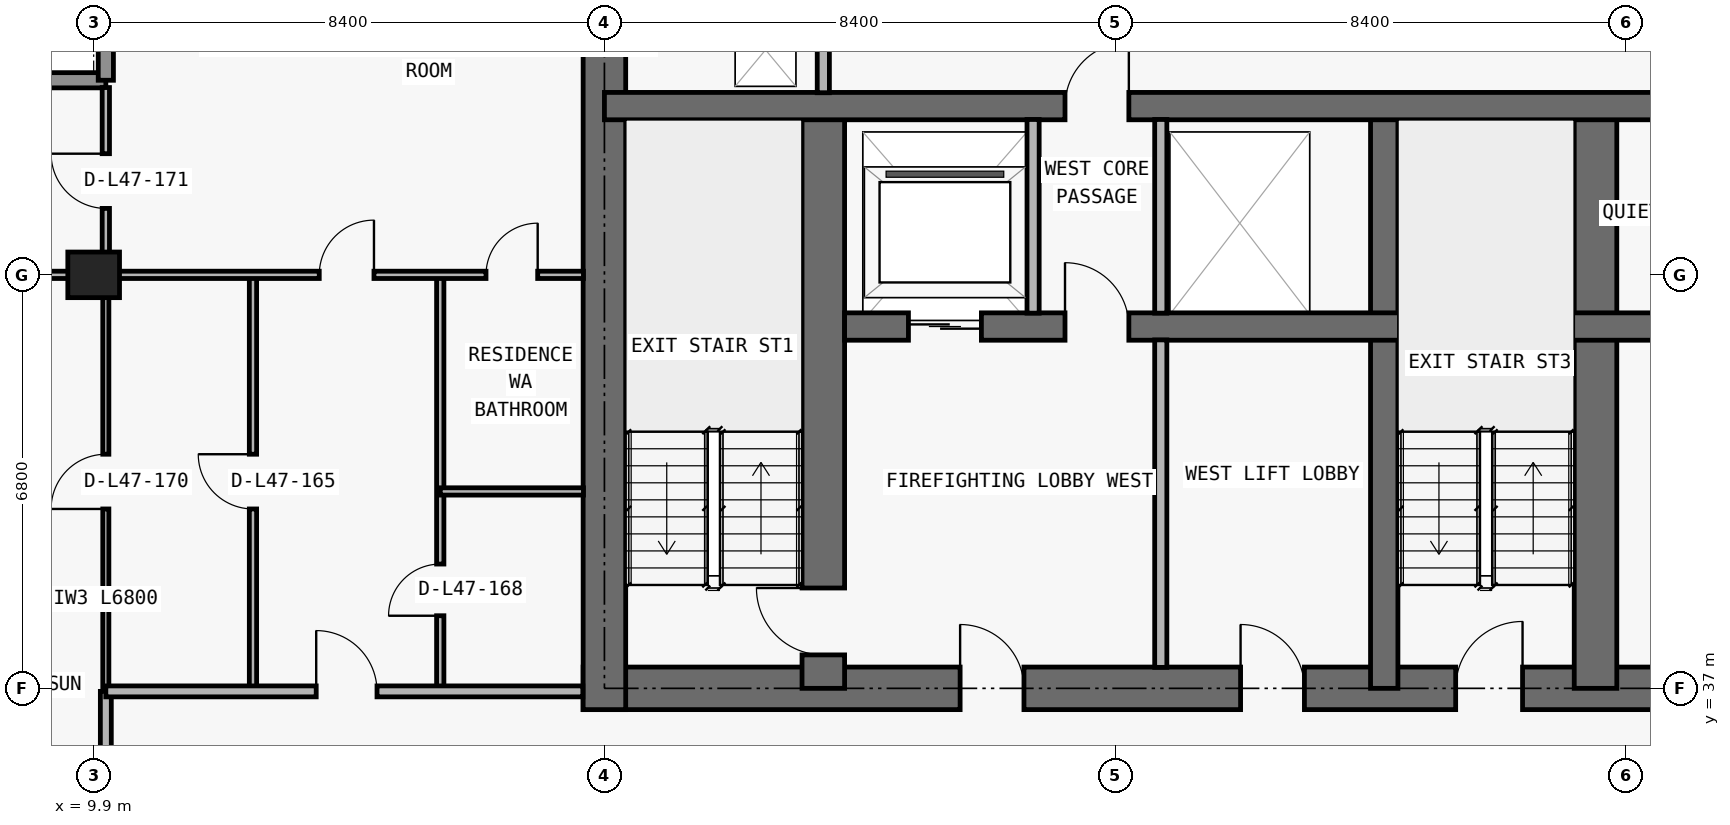
"""IFC4 building model, lengths in metres.
Left out: names, types, materials, properties, quantities, classifications, styles, units other than length and angle.
Written with IfcOpenShell. Run it as: python <this file> out.ifc"""

import sys

from ifc_helpers import new_model, si_unit, direction, frame, frame_2d, origin, origin_2d, place, context, subcontext, project, spatial, rectangle, extrude, element, fill, save


model = new_model("IFC4")
c1 = context("Model", 3, precision=1e-05, world=origin(), true_north=direction((0.0, 1.0)))
c2 = subcontext(c1, "Body", "Model", "MODEL_VIEW")
j1 = project(units=[si_unit("LENGTHUNIT", "METRE"), si_unit("PLANEANGLEUNIT", "RADIAN")], contexts=[c1])
p1 = place(None, origin())
s1 = spatial("IfcSite", under=j1, at=p1, CompositionType="ELEMENT")
p2 = place(p1, origin())
s2 = spatial("IfcBuilding", under=s1, at=p2, CompositionType="ELEMENT")
p3 = place(p2, frame((0.0, 0.0, 170.4)))
s3 = spatial("IfcBuildingStorey", under=s2, at=p3, CompositionType="ELEMENT", Elevation=170.4)
p4 = place(p3, frame((9.9, 43.8, 0.0), z_axis=(0.0, 0.0, 1.0), x_axis=(1.0, 0.0, 0.0)))
e1 = element("IfcColumn", 1, at=p4, inside=s3, PredefinedType="COLUMN", context=c2, shape_type="SweptSolid", body=[
    extrude(rectangle(XDim=0.85, YDim=0.75, at=origin_2d()), origin(), (0.0, 0.0, 1.0), 3.05),
])
p5 = place(p3, frame((17.95, 37.0, 0.0), z_axis=(0.0, 0.0, 1.0), x_axis=(1.0, 0.0, 0.0)))
e2 = element("IfcWall", 2, at=p5, inside=s3, PredefinedType="SHEAR", context=c2, shape_type="SweptSolid", body=[
    extrude(rectangle(XDim=41.9, YDim=0.7, at=frame_2d((20.95, 0.0))), origin(), (0.0, 0.0, 1.0), 3.05),
])
p6 = place(p5, frame((14.35, 0.0, 0.0)))
e3 = element("IfcOpeningElement", 3, at=p6, cuts=e2, PredefinedType="OPENING", context=c2, shape_type="SweptSolid", body=[
    extrude(rectangle(XDim=1.1, YDim=2.15, at=frame_2d((0.55, 1.075))), frame((0.0, 0.36, 0.0), z_axis=(0.0, -1.0, 0.0), x_axis=(1.0, 0.0, 0.0)), (0.0, 0.0, 1.0), 0.72),
])
p7 = place(p5, frame((6.2, 0.0, 0.0)))
e4 = element("IfcOpeningElement", 4, at=p7, cuts=e2, PredefinedType="OPENING", context=c2, shape_type="SweptSolid", body=[
    extrude(rectangle(XDim=1.05, YDim=2.15, at=frame_2d((0.525, 1.075))), frame((0.0, 0.36, 0.0), z_axis=(0.0, -1.0, 0.0), x_axis=(1.0, 0.0, 0.0)), (0.0, 0.0, 1.0), 0.72),
])
p8 = place(p5, frame((34.7, 0.0, 0.0)))
e5 = element("IfcOpeningElement", 5, at=p8, cuts=e2, PredefinedType="OPENING", context=c2, shape_type="SweptSolid", body=[
    extrude(rectangle(XDim=1.05, YDim=2.15, at=frame_2d((0.525, 1.075))), frame((0.0, 0.36, 0.0), z_axis=(0.0, -1.0, 0.0), x_axis=(1.0, 0.0, 0.0)), (0.0, 0.0, 1.0), 0.72),
])
p9 = place(p5, frame((10.812, 0.0, 0.0)))
e6 = element("IfcOpeningElement", 6, at=p9, cuts=e2, PredefinedType="OPENING", context=c2, shape_type="SweptSolid", body=[
    extrude(rectangle(XDim=1.05, YDim=2.15, at=frame_2d((0.525, 1.075))), frame((0.0, 0.36, 0.0), z_axis=(0.0, -1.0, 0.0), x_axis=(1.0, 0.0, 0.0)), (0.0, 0.0, 1.0), 0.72),
])
p10 = place(p5, frame((24.05, 0.0, 0.0)))
e7 = element("IfcOpeningElement", 7, at=p10, cuts=e2, PredefinedType="OPENING", context=c2, shape_type="SweptSolid", body=[
    extrude(rectangle(XDim=1.05, YDim=2.15, at=frame_2d((0.525, 1.075))), frame((0.0, 0.36, 0.0), z_axis=(0.0, -1.0, 0.0), x_axis=(1.0, 0.0, 0.0)), (0.0, 0.0, 1.0), 0.72),
])
p11 = place(p3, frame((18.3, 36.65, 0.0), z_axis=(0.0, 0.0, 1.0), x_axis=(0.0, 1.0, 0.0)))
e8 = element("IfcWall", 8, at=p11, inside=s3, PredefinedType="SHEAR", context=c2, shape_type="SweptSolid", body=[
    extrude(rectangle(XDim=13.95, YDim=0.7, at=frame_2d((6.975, 0.0))), origin(), (0.0, 0.0, 1.0), 3.05),
])
p12 = place(p3, frame((21.9, 37.0, 0.0), z_axis=(0.0, 0.0, 1.0), x_axis=(0.0, 1.0, 0.0)))
e9 = element("IfcWall", 9, at=p12, inside=s3, PredefinedType="SHEAR", context=c2, shape_type="SweptSolid", body=[
    extrude(rectangle(XDim=9.575, YDim=0.7, at=frame_2d((4.788, 0.0))), origin(), (0.0, 0.0, 1.0), 3.05),
])
p13 = place(p12, frame((0.55, 0.0, 0.0)))
e10 = element("IfcOpeningElement", 10, at=p13, cuts=e9, PredefinedType="OPENING", context=c2, shape_type="SweptSolid", body=[
    extrude(rectangle(XDim=1.1, YDim=2.15, at=frame_2d((0.55, 1.075))), frame((0.0, 0.36, 0.0), z_axis=(0.0, -1.0, 0.0), x_axis=(1.0, 0.0, 0.0)), (0.0, 0.0, 1.0), 0.72),
])
p14 = place(p3, frame((31.125, 37.0, 0.0), z_axis=(0.0, 0.0, 1.0), x_axis=(0.0, 1.0, 0.0)))
e11 = element("IfcWall", 11, at=p14, inside=s3, PredefinedType="SHEAR", context=c2, shape_type="SweptSolid", body=[
    extrude(rectangle(XDim=9.575, YDim=0.45, at=frame_2d((4.788, 0.0))), origin(), (0.0, 0.0, 1.0), 3.05),
])
p15 = place(p3, frame((34.6, 37.0, 0.0), z_axis=(0.0, 0.0, 1.0), x_axis=(0.0, 1.0, 0.0)))
e12 = element("IfcWall", 12, at=p15, inside=s3, PredefinedType="SHEAR", context=c2, shape_type="SweptSolid", body=[
    extrude(rectangle(XDim=9.575, YDim=0.7, at=frame_2d((4.788, 0.0))), origin(), (0.0, 0.0, 1.0), 3.05),
])
p16 = place(p3, frame((22.25, 42.95, 0.0), z_axis=(0.0, 0.0, 1.0), x_axis=(1.0, 0.0, 0.0)))
e13 = element("IfcWall", 13, at=p16, inside=s3, PredefinedType="SHEAR", context=c2, shape_type="SweptSolid", body=[
    extrude(rectangle(XDim=33.3, YDim=0.45, at=frame_2d((16.65, 0.0))), origin(), (0.0, 0.0, 1.0), 3.05),
])
p17 = place(p16, frame((1.05, 0.0, 0.0)))
e14 = element("IfcOpeningElement", 14, at=p17, cuts=e13, PredefinedType="OPENING", context=c2, shape_type="SweptSolid", body=[
    extrude(rectangle(XDim=1.2, YDim=2.2, at=frame_2d((0.6, 1.1))), frame((0.0, 0.235, 0.0), z_axis=(0.0, -1.0, 0.0), x_axis=(1.0, 0.0, 0.0)), (0.0, 0.0, 1.0), 0.47),
])
p18 = place(p16, frame((31.05, 0.0, 0.0)))
e15 = element("IfcOpeningElement", 15, at=p18, cuts=e13, PredefinedType="OPENING", context=c2, shape_type="SweptSolid", body=[
    extrude(rectangle(XDim=1.2, YDim=2.2, at=frame_2d((0.6, 1.1))), frame((0.0, 0.235, 0.0), z_axis=(0.0, -1.0, 0.0), x_axis=(1.0, 0.0, 0.0)), (0.0, 0.0, 1.0), 0.47),
])
p19 = place(p16, frame((21.4, 0.0, 0.0)))
e16 = element("IfcOpeningElement", 16, at=p19, cuts=e13, PredefinedType="OPENING", context=c2, shape_type="SweptSolid", body=[
    extrude(rectangle(XDim=1.1, YDim=2.2, at=frame_2d((0.55, 1.1))), frame((0.0, 0.235, 0.0), z_axis=(0.0, -1.0, 0.0), x_axis=(1.0, 0.0, 0.0)), (0.0, 0.0, 1.0), 0.47),
])
p20 = place(p16, frame((24.0, 0.0, 0.0)))
e17 = element("IfcOpeningElement", 17, at=p20, cuts=e13, PredefinedType="OPENING", context=c2, shape_type="SweptSolid", body=[
    extrude(rectangle(XDim=1.1, YDim=2.2, at=frame_2d((0.55, 1.1))), frame((0.0, 0.235, 0.0), z_axis=(0.0, -1.0, 0.0), x_axis=(1.0, 0.0, 0.0)), (0.0, 0.0, 1.0), 0.47),
])
p21 = place(p16, frame((3.625, 0.0, 0.0)))
e18 = element("IfcOpeningElement", 18, at=p21, cuts=e13, PredefinedType="OPENING", context=c2, shape_type="SweptSolid", body=[
    extrude(rectangle(XDim=1.05, YDim=2.15, at=frame_2d((0.525, 1.075))), frame((0.0, 0.235, 0.0), z_axis=(0.0, -1.0, 0.0), x_axis=(1.0, 0.0, 0.0)), (0.0, 0.0, 1.0), 0.47),
])
p22 = place(p16, frame((28.675, 0.0, 0.0)))
e19 = element("IfcOpeningElement", 19, at=p22, cuts=e13, PredefinedType="OPENING", context=c2, shape_type="SweptSolid", body=[
    extrude(rectangle(XDim=1.05, YDim=2.15, at=frame_2d((0.525, 1.075))), frame((0.0, 0.235, 0.0), z_axis=(0.0, -1.0, 0.0), x_axis=(1.0, 0.0, 0.0)), (0.0, 0.0, 1.0), 0.47),
])
p23 = place(p16, frame((15.975, 0.0, 0.0)))
e20 = element("IfcOpeningElement", 20, at=p23, cuts=e13, PredefinedType="OPENING", context=c2, shape_type="SweptSolid", body=[
    extrude(rectangle(XDim=1.0, YDim=2.2, at=frame_2d((0.5, 1.1))), frame((0.0, 0.235, 0.0), z_axis=(0.0, -1.0, 0.0), x_axis=(1.0, 0.0, 0.0)), (0.0, 0.0, 1.0), 0.47),
])
p24 = place(p3, frame((18.3, 46.575, 0.0), z_axis=(0.0, 0.0, 1.0), x_axis=(1.0, 0.0, 0.0)))
e21 = element("IfcWall", 21, at=p24, inside=s3, PredefinedType="SHEAR", context=c2, shape_type="SweptSolid", body=[
    extrude(rectangle(XDim=41.2, YDim=0.45, at=frame_2d((20.6, 0.0))), origin(), (0.0, 0.0, 1.0), 3.05),
])
p25 = place(p24, frame((7.575, 0.0, 0.0)))
e22 = element("IfcOpeningElement", 22, at=p25, cuts=e21, PredefinedType="OPENING", context=c2, shape_type="SweptSolid", body=[
    extrude(rectangle(XDim=1.05, YDim=2.15, at=frame_2d((0.525, 1.075))), frame((0.0, 0.235, 0.0), z_axis=(0.0, -1.0, 0.0), x_axis=(1.0, 0.0, 0.0)), (0.0, 0.0, 1.0), 0.47),
])
p26 = place(p24, frame((32.625, 0.0, 0.0)))
e23 = element("IfcOpeningElement", 23, at=p26, cuts=e21, PredefinedType="OPENING", context=c2, shape_type="SweptSolid", body=[
    extrude(rectangle(XDim=1.05, YDim=2.15, at=frame_2d((0.525, 1.075))), frame((0.0, 0.235, 0.0), z_axis=(0.0, -1.0, 0.0), x_axis=(1.0, 0.0, 0.0)), (0.0, 0.0, 1.0), 0.47),
])
p27 = place(p3, frame((6.25, 47.0, 0.0), z_axis=(0.0, 0.0, 1.0), x_axis=(1.0, 0.0, 0.0)))
e24 = element("IfcWall", 24, at=p27, inside=s3, PredefinedType="ELEMENTEDWALL", context=c2, shape_type="SweptSolid", body=[
    extrude(rectangle(XDim=3.85, YDim=0.25, at=frame_2d((1.925, 0.0))), origin(), (0.0, 0.0, 1.0), 3.05),
])
p28 = place(p3, frame((10.1, 47.0, 0.0), z_axis=(0.0, 0.0, 1.0), x_axis=(0.0, 1.0, 0.0)))
e25 = element("IfcWall", 25, at=p28, inside=s3, PredefinedType="ELEMENTEDWALL", context=c2, shape_type="SweptSolid", body=[
    extrude(rectangle(XDim=3.45, YDim=0.25, at=frame_2d((1.725, 0.0))), origin(), (0.0, 0.0, 1.0), 3.05),
])
p29 = place(p3, frame((10.1, 33.705, 0.0), z_axis=(0.0, 0.0, 1.0), x_axis=(0.0, 1.0, 0.0)))
e26 = element("IfcWall", 26, at=p29, inside=s3, PredefinedType="PARTITIONING", context=c2, shape_type="SweptSolid", body=[
    extrude(rectangle(XDim=3.245, YDim=0.18, at=frame_2d((1.623, 0.0))), origin(), (0.0, 0.0, 1.0), 2.263),
])
p30 = place(p3, frame((10.1, 37.0, 0.0), z_axis=(0.0, 0.0, 1.0), x_axis=(0.0, 1.0, 0.0)))
e27 = element("IfcWall", 27, at=p30, inside=s3, PredefinedType="MOVABLE", context=c2, shape_type="SweptSolid", body=[
    extrude(rectangle(XDim=6.8, YDim=0.1, at=frame_2d((3.4, 0.0))), origin(), (0.0, 0.0, 1.0), 2.263),
])
p31 = place(p30, frame((2.95, 0.0, 0.0)))
e28 = element("IfcOpeningElement", 28, at=p31, cuts=e27, PredefinedType="OPENING", context=c2, shape_type="SweptSolid", body=[
    extrude(rectangle(XDim=0.9, YDim=2.15, at=frame_2d((0.45, 1.075))), frame((0.0, 0.06, 0.0), z_axis=(0.0, -1.0, 0.0), x_axis=(1.0, 0.0, 0.0)), (0.0, 0.0, 1.0), 0.12),
])
p32 = place(p3, frame((10.1, 43.805, 0.0), z_axis=(0.0, 0.0, 1.0), x_axis=(0.0, 1.0, 0.0)))
e29 = element("IfcWall", 29, at=p32, inside=s3, PredefinedType="PARTITIONING", context=c2, shape_type="SweptSolid", body=[
    extrude(rectangle(XDim=3.075, YDim=0.12, at=frame_2d((1.538, 0.0))), origin(), (0.0, 0.0, 1.0), 3.05),
])
p33 = place(p32, frame((1.087, 0.0, 0.0)))
e30 = element("IfcOpeningElement", 30, at=p33, cuts=e29, PredefinedType="OPENING", context=c2, shape_type="SweptSolid", body=[
    extrude(rectangle(XDim=0.9, YDim=2.15, at=frame_2d((0.45, 1.075))), frame((0.0, 0.07, 0.0), z_axis=(0.0, -1.0, 0.0), x_axis=(1.0, 0.0, 0.0)), (0.0, 0.0, 1.0), 0.14),
])
p34 = place(p3, frame((12.52, 37.0, 0.0), z_axis=(0.0, 0.0, 1.0), x_axis=(0.0, 1.0, 0.0)))
e31 = element("IfcWall", 31, at=p34, inside=s3, PredefinedType="PARTITIONING", context=c2, shape_type="SweptSolid", body=[
    extrude(rectangle(XDim=6.8, YDim=0.12, at=frame_2d((3.4, 0.0))), origin(), (0.0, 0.0, 1.0), 3.05),
])
p35 = place(p34, frame((2.95, 0.0, 0.0)))
e32 = element("IfcOpeningElement", 32, at=p35, cuts=e31, PredefinedType="OPENING", context=c2, shape_type="SweptSolid", body=[
    extrude(rectangle(XDim=0.9, YDim=2.15, at=frame_2d((0.45, 1.075))), frame((0.0, 0.07, 0.0), z_axis=(0.0, -1.0, 0.0), x_axis=(1.0, 0.0, 0.0)), (0.0, 0.0, 1.0), 0.14),
])
p36 = place(p3, frame((15.6, 37.0, 0.0), z_axis=(0.0, 0.0, 1.0), x_axis=(0.0, 1.0, 0.0)))
e33 = element("IfcWall", 33, at=p36, inside=s3, PredefinedType="PARTITIONING", context=c2, shape_type="SweptSolid", body=[
    extrude(rectangle(XDim=6.8, YDim=0.12, at=frame_2d((3.4, 0.0))), origin(), (0.0, 0.0, 1.0), 3.05),
])
p37 = place(p36, frame((1.194, 0.0, 0.0)))
e34 = element("IfcOpeningElement", 34, at=p37, cuts=e33, PredefinedType="OPENING", context=c2, shape_type="SweptSolid", body=[
    extrude(rectangle(XDim=0.85, YDim=2.1, at=frame_2d((0.425, 1.05))), frame((0.0, 0.07, 0.0), z_axis=(0.0, -1.0, 0.0), x_axis=(1.0, 0.0, 0.0)), (0.0, 0.0, 1.0), 0.14),
])
p38 = place(p3, frame((21.9, 46.795, 0.0), z_axis=(0.0, 0.0, 1.0), x_axis=(0.0, 1.0, 0.0)))
e35 = element("IfcWall", 35, at=p38, inside=s3, PredefinedType="PARTITIONING", context=c2, shape_type="SweptSolid", body=[
    extrude(rectangle(XDim=3.16, YDim=0.2, at=frame_2d((1.58, 0.0))), origin(), (0.0, 0.0, 1.0), 3.05),
])
p39 = place(p3, frame((25.35, 43.17, 0.0), z_axis=(0.0, 0.0, 1.0), x_axis=(0.0, 1.0, 0.0)))
e36 = element("IfcWall", 36, at=p39, inside=s3, PredefinedType="PARTITIONING", context=c2, shape_type="SweptSolid", body=[
    extrude(rectangle(XDim=3.185, YDim=0.2, at=frame_2d((1.593, 0.0))), origin(), (0.0, 0.0, 1.0), 3.05),
])
p40 = place(p3, frame((27.45, 37.345, 0.0), z_axis=(0.0, 0.0, 1.0), x_axis=(0.0, 1.0, 0.0)))
e37 = element("IfcWall", 37, at=p40, inside=s3, PredefinedType="PARTITIONING", context=c2, shape_type="SweptSolid", body=[
    extrude(rectangle(XDim=5.385, YDim=0.2, at=frame_2d((2.692, 0.0))), origin(), (0.0, 0.0, 1.0), 3.05),
])
p41 = place(p3, frame((27.45, 43.17, 0.0), z_axis=(0.0, 0.0, 1.0), x_axis=(0.0, 1.0, 0.0)))
e38 = element("IfcWall", 38, at=p41, inside=s3, PredefinedType="PARTITIONING", context=c2, shape_type="SweptSolid", body=[
    extrude(rectangle(XDim=3.185, YDim=0.2, at=frame_2d((1.593, 0.0))), origin(), (0.0, 0.0, 1.0), 3.05),
])
p42 = place(p3, frame((10.1, 36.95, 0.0), z_axis=(0.0, 0.0, 1.0), x_axis=(1.0, 0.0, 0.0)))
e39 = element("IfcWall", 39, at=p42, inside=s3, PredefinedType="PARTITIONING", context=c2, shape_type="SweptSolid", body=[
    extrude(rectangle(XDim=7.845, YDim=0.18, at=frame_2d((3.922, 0.0))), origin(), (0.0, 0.0, 1.0), 3.05),
])
p43 = place(p42, frame((3.46, 0.0, 0.0)))
e40 = element("IfcOpeningElement", 40, at=p43, cuts=e39, PredefinedType="OPENING", context=c2, shape_type="SweptSolid", body=[
    extrude(rectangle(XDim=1.0, YDim=2.2, at=frame_2d((0.5, 1.1))), frame((0.0, 0.1, 0.0), z_axis=(0.0, -1.0, 0.0), x_axis=(1.0, 0.0, 0.0)), (0.0, 0.0, 1.0), 0.2),
])
p44 = place(p3, frame((15.6, 40.238, 0.0), z_axis=(0.0, 0.0, 1.0), x_axis=(1.0, 0.0, 0.0)))
e41 = element("IfcWall", 41, at=p44, inside=s3, PredefinedType="PARTITIONING", context=c2, shape_type="SweptSolid", body=[
    extrude(rectangle(XDim=2.355, YDim=0.12, at=frame_2d((1.177, 0.0))), origin(), (0.0, 0.0, 1.0), 3.05),
])
p45 = place(p3, frame((6.395, 43.8, 0.0), z_axis=(0.0, 0.0, 1.0), x_axis=(1.0, 0.0, 0.0)))
e42 = element("IfcWall", 42, at=p45, inside=s3, PredefinedType="PARTITIONING", context=c2, shape_type="SweptSolid", body=[
    extrude(rectangle(XDim=11.56, YDim=0.12, at=frame_2d((5.78, 0.0))), origin(), (0.0, 0.0, 1.0), 2.418),
])
p46 = place(p45, frame((7.215, 0.0, 0.0)))
e43 = element("IfcOpeningElement", 43, at=p46, cuts=e42, PredefinedType="OPENING", context=c2, shape_type="SweptSolid", body=[
    extrude(rectangle(XDim=0.9, YDim=2.15, at=frame_2d((0.45, 1.075))), frame((0.0, 0.07, 0.0), z_axis=(0.0, -1.0, 0.0), x_axis=(1.0, 0.0, 0.0)), (0.0, 0.0, 1.0), 0.14),
])
p47 = place(p45, frame((9.958, 0.0, 0.0)))
e44 = element("IfcOpeningElement", 44, at=p47, cuts=e42, PredefinedType="OPENING", context=c2, shape_type="SweptSolid", body=[
    extrude(rectangle(XDim=0.85, YDim=2.1, at=frame_2d((0.425, 1.05))), frame((0.0, 0.07, 0.0), z_axis=(0.0, -1.0, 0.0), x_axis=(1.0, 0.0, 0.0)), (0.0, 0.0, 1.0), 0.14),
])
p48 = place(p17, origin())
e45 = element("IfcDoor", 45, at=p48, inside=s3, OperationType="DOUBLE_DOOR_SLIDING", PredefinedType="DOOR", context=c2, shape_type="SweptSolid", body=[
    extrude(rectangle(XDim=1.2, YDim=2.2, at=frame_2d((0.6, 1.1))), frame((0.0, 0.025, 0.0), z_axis=(0.0, -1.0, 0.0), x_axis=(1.0, 0.0, 0.0)), (0.0, 0.0, 1.0), 0.05),
])
fill(e14, e45)
p49 = place(p6, origin())
e46 = element("IfcDoor", 46, at=p49, inside=s3, OperationType="SINGLE_SWING_RIGHT", PredefinedType="DOOR", context=c2, shape_type="SweptSolid", body=[
    extrude(rectangle(XDim=1.1, YDim=2.15, at=frame_2d((0.55, 1.075))), frame((0.0, 0.025, 0.0), z_axis=(0.0, -1.0, 0.0), x_axis=(1.0, 0.0, 0.0)), (0.0, 0.0, 1.0), 0.05),
])
fill(e3, e46)
p50 = place(p7, origin())
e47 = element("IfcDoor", 47, at=p50, inside=s3, OperationType="SINGLE_SWING_LEFT", PredefinedType="DOOR", context=c2, shape_type="SweptSolid", body=[
    extrude(rectangle(XDim=1.05, YDim=2.15, at=frame_2d((0.525, 1.075))), frame((0.0, 0.025, 0.0), z_axis=(0.0, -1.0, 0.0), x_axis=(1.0, 0.0, 0.0)), (0.0, 0.0, 1.0), 0.05),
])
fill(e4, e47)
p51 = place(p13, origin())
e48 = element("IfcDoor", 48, at=p51, inside=s3, OperationType="SINGLE_SWING_RIGHT", PredefinedType="DOOR", context=c2, shape_type="SweptSolid", body=[
    extrude(rectangle(XDim=1.1, YDim=2.15, at=frame_2d((0.55, 1.075))), frame((0.0, 0.025, 0.0), z_axis=(0.0, -1.0, 0.0), x_axis=(1.0, 0.0, 0.0)), (0.0, 0.0, 1.0), 0.05),
])
fill(e10, e48)
p52 = place(p21, origin())
e49 = element("IfcDoor", 49, at=p52, inside=s3, OperationType="SINGLE_SWING_LEFT", PredefinedType="DOOR", context=c2, shape_type="SweptSolid", body=[
    extrude(rectangle(XDim=1.05, YDim=2.15, at=frame_2d((0.525, 1.075))), frame((0.0, 0.025, 0.0), z_axis=(0.0, -1.0, 0.0), x_axis=(1.0, 0.0, 0.0)), (0.0, 0.0, 1.0), 0.05),
])
fill(e18, e49)
p53 = place(p9, origin())
e50 = element("IfcDoor", 50, at=p53, inside=s3, OperationType="SINGLE_SWING_LEFT", PredefinedType="DOOR", context=c2, shape_type="SweptSolid", body=[
    extrude(rectangle(XDim=1.05, YDim=2.15, at=frame_2d((0.525, 1.075))), frame((0.0, 0.025, 0.0), z_axis=(0.0, -1.0, 0.0), x_axis=(1.0, 0.0, 0.0)), (0.0, 0.0, 1.0), 0.05),
])
fill(e6, e50)
p54 = place(p25, origin())
e51 = element("IfcDoor", 51, at=p54, inside=s3, OperationType="SINGLE_SWING_RIGHT", PredefinedType="DOOR", context=c2, shape_type="SweptSolid", body=[
    extrude(rectangle(XDim=1.05, YDim=2.15, at=frame_2d((0.525, 1.075))), frame((0.0, 0.025, 0.0), z_axis=(0.0, -1.0, 0.0), x_axis=(1.0, 0.0, 0.0)), (0.0, 0.0, 1.0), 0.05),
])
fill(e22, e51)
p55 = place(p35, origin())
e52 = element("IfcDoor", 52, at=p55, inside=s3, OperationType="SINGLE_SWING_RIGHT", PredefinedType="DOOR", context=c2, shape_type="SweptSolid", body=[
    extrude(rectangle(XDim=0.9, YDim=2.15, at=frame_2d((0.45, 1.075))), frame((0.0, 0.025, 0.0), z_axis=(0.0, -1.0, 0.0), x_axis=(1.0, 0.0, 0.0)), (0.0, 0.0, 1.0), 0.05),
])
fill(e32, e52)
p56 = place(p43, origin())
e53 = element("IfcDoor", 53, at=p56, inside=s3, OperationType="SINGLE_SWING_LEFT", PredefinedType="DOOR", context=c2, shape_type="SweptSolid", body=[
    extrude(rectangle(XDim=1.0, YDim=2.2, at=frame_2d((0.5, 1.1))), frame((0.0, 0.025, 0.0), z_axis=(0.0, -1.0, 0.0), x_axis=(1.0, 0.0, 0.0)), (0.0, 0.0, 1.0), 0.05),
])
fill(e40, e53)
p57 = place(p46, origin())
e54 = element("IfcDoor", 54, at=p57, inside=s3, OperationType="SINGLE_SWING_RIGHT", PredefinedType="DOOR", context=c2, shape_type="SweptSolid", body=[
    extrude(rectangle(XDim=0.9, YDim=2.15, at=frame_2d((0.45, 1.075))), frame((0.0, 0.025, 0.0), z_axis=(0.0, -1.0, 0.0), x_axis=(1.0, 0.0, 0.0)), (0.0, 0.0, 1.0), 0.05),
])
fill(e43, e54)
p58 = place(p37, origin())
e55 = element("IfcDoor", 55, at=p58, inside=s3, OperationType="SINGLE_SWING_LEFT", PredefinedType="DOOR", context=c2, shape_type="SweptSolid", body=[
    extrude(rectangle(XDim=0.85, YDim=2.1, at=frame_2d((0.425, 1.05))), frame((0.0, 0.025, 0.0), z_axis=(0.0, -1.0, 0.0), x_axis=(1.0, 0.0, 0.0)), (0.0, 0.0, 1.0), 0.05),
])
fill(e34, e55)
p59 = place(p47, origin())
e56 = element("IfcDoor", 56, at=p59, inside=s3, OperationType="SINGLE_SWING_RIGHT", PredefinedType="DOOR", context=c2, shape_type="SweptSolid", body=[
    extrude(rectangle(XDim=0.85, YDim=2.1, at=frame_2d((0.425, 1.05))), frame((0.0, 0.025, 0.0), z_axis=(0.0, -1.0, 0.0), x_axis=(1.0, 0.0, 0.0)), (0.0, 0.0, 1.0), 0.05),
])
fill(e44, e56)
p60 = place(p31, origin())
e57 = element("IfcDoor", 57, at=p60, inside=s3, OperationType="SINGLE_SWING_LEFT", PredefinedType="DOOR", context=c2, shape_type="SweptSolid", body=[
    extrude(rectangle(XDim=0.9, YDim=2.15, at=frame_2d((0.45, 1.075))), frame((0.0, 0.025, 0.0), z_axis=(0.0, -1.0, 0.0), x_axis=(1.0, 0.0, 0.0)), (0.0, 0.0, 1.0), 0.05),
])
fill(e28, e57)
p61 = place(p33, origin())
e58 = element("IfcDoor", 58, at=p61, inside=s3, OperationType="SINGLE_SWING_RIGHT", PredefinedType="DOOR", context=c2, shape_type="SweptSolid", body=[
    extrude(rectangle(XDim=0.9, YDim=2.15, at=frame_2d((0.45, 1.075))), frame((0.0, 0.025, 0.0), z_axis=(0.0, -1.0, 0.0), x_axis=(1.0, 0.0, 0.0)), (0.0, 0.0, 1.0), 0.05),
])
fill(e30, e58)
save(model, sys.argv[1])
